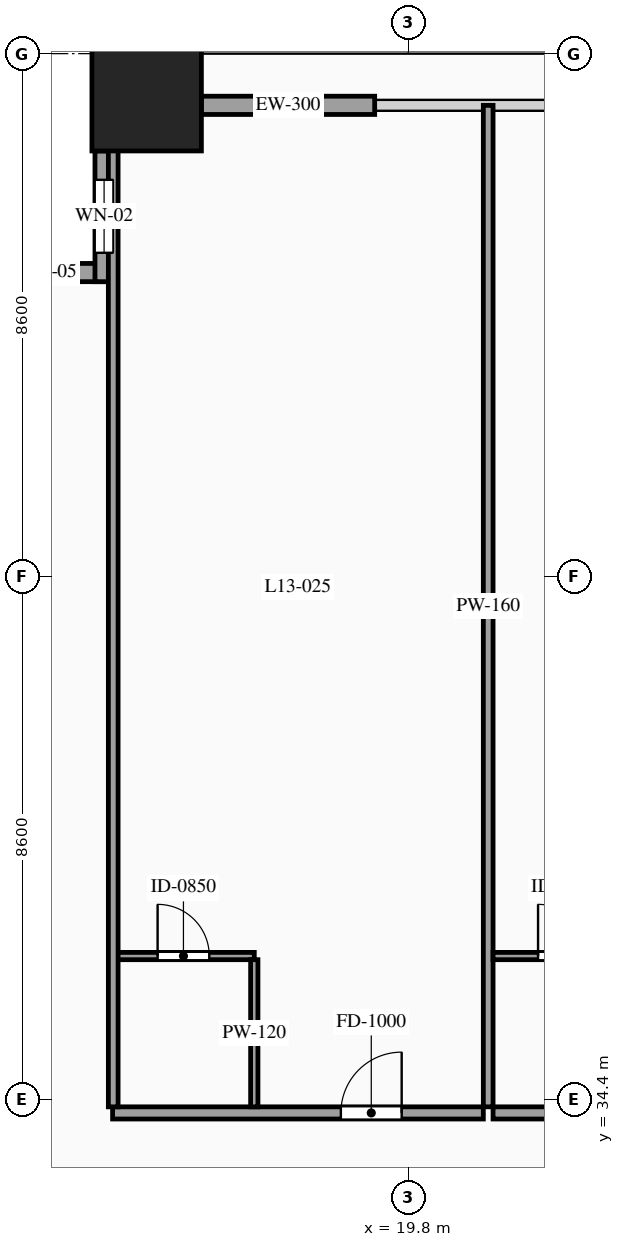
"""IFC4 building model, lengths in metres.
Left out: names, types, materials, properties, quantities, classifications, styles, units other than length and angle.
Written with IfcOpenShell. Run it as: python <this file> out.ifc"""

import sys

from ifc_helpers import new_model, si_unit, direction, frame, frame_2d, origin, origin_2d, place, context, subcontext, project, spatial, rectangle, hollow_rectangle, extrude, source, transform, mapped, element, fill, save


model = new_model("IFC4")
c1 = context("Model", 3, precision=1e-05, world=origin(), true_north=direction((0.0, 1.0)))
c2 = subcontext(c1, "Body", "Model", "MODEL_VIEW")
j1 = project(units=[si_unit("LENGTHUNIT", "METRE"), si_unit("PLANEANGLEUNIT", "RADIAN")], contexts=[c1])
p1 = place(None, origin())
s1 = spatial("IfcSite", under=j1, at=p1, CompositionType="ELEMENT")
p2 = place(p1, origin())
s2 = spatial("IfcBuilding", under=s1, at=p2, CompositionType="ELEMENT")
p3 = place(p2, frame((0.0, 0.0, 53.2)))
s3 = spatial("IfcBuildingStorey", under=s2, at=p3, CompositionType="ELEMENT", Elevation=53.2)
m1 = source(origin(), c2, "Body", "SweptSolid", [
    extrude(hollow_rectangle(XDim=1.8, YDim=1.8, WallThickness=0.08, at=origin_2d()), origin(), (0.0, 0.0, 1.0), 3.6),
])
p4 = place(p3, frame((15.5, 50.9, 0.0), z_axis=(0.0, 0.0, 1.0), x_axis=(1.0, 0.0, 0.0)))
e1 = element("IfcColumn", 1, at=p4, inside=s3, PredefinedType="COLUMN", context=c2, shape_type="MappedRepresentation", body=[
    mapped(m1, transform((0.0, 0.0, 0.0), scale=1.0)),
])
p5 = place(p3, frame((14.95, 48.0, 0.0), z_axis=(0.0, 0.0, 1.0), x_axis=(-1.0, 0.0, 0.0)))
e2 = element("IfcWall", 2, at=p5, inside=s3, PredefinedType="SOLIDWALL", context=c2, shape_type="SweptSolid", body=[
    extrude(rectangle(XDim=2.15, YDim=0.3, at=frame_2d((1.075, 0.0))), origin(), (0.0, 0.0, 1.0), 3.38),
])
p6 = place(p5, frame((0.625, 0.0, 0.85)))
e3 = element("IfcOpeningElement", 3, at=p6, cuts=e2, PredefinedType="OPENING", context=c2, shape_type="SweptSolid", body=[
    extrude(rectangle(XDim=0.9, YDim=1.5, at=frame_2d((0.45, 0.75))), frame((0.0, 0.165, 0.0), z_axis=(0.0, -1.0, 0.0), x_axis=(1.0, 0.0, 0.0)), (0.0, 0.0, 1.0), 0.33),
])
p7 = place(p3, frame((14.8, 50.0, 0.0), z_axis=(0.0, 0.0, 1.0), x_axis=(0.0, -1.0, 0.0)))
e4 = element("IfcWall", 4, at=p7, inside=s3, PredefinedType="SOLIDWALL", context=c2, shape_type="SweptSolid", body=[
    extrude(rectangle(XDim=2.15, YDim=0.3, at=frame_2d((1.075, 0.0))), origin(), (0.0, 0.0, 1.0), 3.38),
])
p8 = place(p7, frame((0.475, 0.0, 0.85)))
e5 = element("IfcOpeningElement", 5, at=p8, cuts=e4, PredefinedType="OPENING", context=c2, shape_type="SweptSolid", body=[
    extrude(rectangle(XDim=1.2, YDim=2.1, at=frame_2d((0.6, 1.05))), frame((0.0, 0.165, 0.0), z_axis=(0.0, -1.0, 0.0), x_axis=(1.0, 0.0, 0.0)), (0.0, 0.0, 1.0), 0.33),
])
m2 = source(origin(), c2, "Body", "SweptSolid", [
    extrude(rectangle(XDim=2.85, YDim=0.3, at=frame_2d((1.425, 0.0))), origin(), (0.0, 0.0, 1.0), 2.775),
])
p9 = place(p3, frame((16.4, 50.75, 0.0), z_axis=(0.0, 0.0, 1.0), x_axis=(1.0, 0.0, 0.0)))
e6 = element("IfcWall", 6, at=p9, inside=s3, PredefinedType="SOLIDWALL", context=c2, shape_type="MappedRepresentation", body=[
    mapped(m2, transform((0.0, 0.0, 0.0), scale=1.0)),
])
p10 = place(p3, frame((14.94, 34.18, 0.0), z_axis=(0.0, 0.0, 1.0), x_axis=(1.0, 0.0, 0.0)))
e7 = element("IfcWall", 7, at=p10, inside=s3, PredefinedType="PARTITIONING", context=c2, shape_type="SweptSolid", body=[
    extrude(rectangle(XDim=6.097, YDim=0.2, at=frame_2d((3.049, 0.0))), origin(), (0.0, 0.0, 1.0), 3.38),
])
p11 = place(p10, frame((3.754, 0.0, 0.0)))
e8 = element("IfcOpeningElement", 8, at=p11, cuts=e7, PredefinedType="OPENING", context=c2, shape_type="SweptSolid", body=[
    extrude(rectangle(XDim=1.0, YDim=2.2, at=frame_2d((0.5, 1.1))), frame((0.0, 0.115, 0.0), z_axis=(0.0, -1.0, 0.0), x_axis=(1.0, 0.0, 0.0)), (0.0, 0.0, 1.0), 0.23),
])
m3 = source(origin(), c2, "Body", "SweptSolid", [
    extrude(rectangle(XDim=16.47, YDim=0.16, at=frame_2d((8.235, 0.0))), origin(), (0.0, 0.0, 1.0), 3.38),
])
p12 = place(p3, frame((21.117, 34.28, 0.0), z_axis=(0.0, 0.0, 1.0), x_axis=(0.0, 1.0, 0.0)))
e9 = element("IfcWall", 9, at=p12, inside=s3, PredefinedType="PARTITIONING", context=c2, shape_type="MappedRepresentation", body=[
    mapped(m3, transform((0.0, 0.0, 0.0), scale=1.0)),
])
p13 = place(p3, frame((14.94, 36.76, 0.0), z_axis=(0.0, 0.0, 1.0), x_axis=(1.0, 0.0, 0.0)))
e10 = element("IfcWall", 10, at=p13, inside=s3, PredefinedType="PARTITIONING", context=c2, shape_type="SweptSolid", body=[
    extrude(rectangle(XDim=2.33, YDim=0.12, at=frame_2d((1.165, 0.0))), origin(), (0.0, 0.0, 1.0), 3.38),
])
p14 = place(p13, frame((0.74, 0.0, 0.0)))
e11 = element("IfcOpeningElement", 11, at=p14, cuts=e10, PredefinedType="OPENING", context=c2, shape_type="SweptSolid", body=[
    extrude(rectangle(XDim=0.85, YDim=2.1, at=frame_2d((0.425, 1.05))), frame((0.0, 0.075, 0.0), z_axis=(0.0, -1.0, 0.0), x_axis=(1.0, 0.0, 0.0)), (0.0, 0.0, 1.0), 0.15),
])
m4 = source(origin(), c2, "Body", "SweptSolid", [
    extrude(rectangle(XDim=2.42, YDim=0.12, at=frame_2d((1.21, 0.0))), origin(), (0.0, 0.0, 1.0), 3.38),
])
p15 = place(p3, frame((17.27, 34.28, 0.0), z_axis=(0.0, 0.0, 1.0), x_axis=(0.0, 1.0, 0.0)))
e12 = element("IfcWall", 12, at=p15, inside=s3, PredefinedType="PARTITIONING", context=c2, shape_type="MappedRepresentation", body=[
    mapped(m4, transform((0.0, 0.0, 0.0), scale=1.0)),
])
p16 = place(p3, frame((21.197, 34.18, 0.0), z_axis=(0.0, 0.0, 1.0), x_axis=(1.0, 0.0, 0.0)))
e13 = element("IfcWall", 13, at=p16, inside=s3, PredefinedType="PARTITIONING", context=c2, shape_type="SweptSolid", body=[
    extrude(rectangle(XDim=7.063, YDim=0.2, at=frame_2d((3.531, 0.0))), origin(), (0.0, 0.0, 1.0), 3.38),
])
p17 = place(p16, frame((4.237, 0.0, 0.0)))
e14 = element("IfcOpeningElement", 14, at=p17, cuts=e13, PredefinedType="OPENING", context=c2, shape_type="SweptSolid", body=[
    extrude(rectangle(XDim=1.0, YDim=2.2, at=frame_2d((0.5, 1.1))), frame((0.0, 0.115, 0.0), z_axis=(0.0, -1.0, 0.0), x_axis=(1.0, 0.0, 0.0)), (0.0, 0.0, 1.0), 0.23),
])
p18 = place(p3, frame((21.197, 36.76, 0.0), z_axis=(0.0, 0.0, 1.0), x_axis=(1.0, 0.0, 0.0)))
e15 = element("IfcWall", 15, at=p18, inside=s3, PredefinedType="PARTITIONING", context=c2, shape_type="SweptSolid", body=[
    extrude(rectangle(XDim=2.33, YDim=0.12, at=frame_2d((1.165, 0.0))), origin(), (0.0, 0.0, 1.0), 3.38),
])
p19 = place(p18, frame((0.74, 0.0, 0.0)))
e16 = element("IfcOpeningElement", 16, at=p19, cuts=e15, PredefinedType="OPENING", context=c2, shape_type="SweptSolid", body=[
    extrude(rectangle(XDim=0.85, YDim=2.1, at=frame_2d((0.425, 1.05))), frame((0.0, 0.075, 0.0), z_axis=(0.0, -1.0, 0.0), x_axis=(1.0, 0.0, 0.0)), (0.0, 0.0, 1.0), 0.15),
])
m5 = source(origin(), c2, "Body", "SweptSolid", [
    extrude(rectangle(XDim=16.32, YDim=0.16, at=frame_2d((8.16, 0.0))), origin(), (0.0, 0.0, 1.0), 3.38),
])
p20 = place(p3, frame((14.95, 34.28, 0.0), z_axis=(0.0, 0.0, 1.0), x_axis=(0.0, 1.0, 0.0)))
e17 = element("IfcWall", 17, at=p20, inside=s3, PredefinedType="PARTITIONING", context=c2, shape_type="MappedRepresentation", body=[
    mapped(m5, transform((0.0, 0.0, 0.0), scale=1.0)),
])
m6 = source(origin(), c2, "Body", "SweptSolid", [
    extrude(rectangle(XDim=0.9, YDim=1.5, at=frame_2d((0.45, 0.75))), frame((0.0, 0.03, 0.0), z_axis=(0.0, -1.0, 0.0), x_axis=(1.0, 0.0, 0.0)), (0.0, 0.0, 1.0), 0.06),
])
p21 = place(p6, origin())
e18 = element("IfcWindow", 18, at=p21, inside=s3, PartitioningType="SINGLE_PANEL", PredefinedType="WINDOW", context=c2, shape_type="MappedRepresentation", body=[
    mapped(m6, transform((0.0, 0.0, 0.0), scale=1.0)),
])
fill(e3, e18)
m7 = source(origin(), c2, "Body", "SweptSolid", [
    extrude(rectangle(XDim=1.2, YDim=2.1, at=frame_2d((0.6, 1.05))), frame((0.0, 0.03, 0.0), z_axis=(0.0, -1.0, 0.0), x_axis=(1.0, 0.0, 0.0)), (0.0, 0.0, 1.0), 0.06),
])
p22 = place(p8, origin())
e19 = element("IfcWindow", 19, at=p22, inside=s3, PartitioningType="SINGLE_PANEL", PredefinedType="WINDOW", context=c2, shape_type="MappedRepresentation", body=[
    mapped(m7, transform((0.0, 0.0, 0.0), scale=1.0)),
])
fill(e5, e19)
m8 = source(origin(), c2, "Body", "SweptSolid", [
    extrude(rectangle(XDim=1.0, YDim=2.2, at=frame_2d((0.5, 1.1))), frame((0.0, 0.025, 0.0), z_axis=(0.0, -1.0, 0.0), x_axis=(1.0, 0.0, 0.0)), (0.0, 0.0, 1.0), 0.05),
])
p23 = place(p11, origin())
e20 = element("IfcDoor", 20, at=p23, inside=s3, OperationType="SINGLE_SWING_RIGHT", PredefinedType="DOOR", context=c2, shape_type="MappedRepresentation", body=[
    mapped(m8, transform((0.0, 0.0, 0.0), scale=1.0)),
])
fill(e8, e20)
m9 = source(origin(), c2, "Body", "SweptSolid", [
    extrude(rectangle(XDim=0.85, YDim=2.1, at=frame_2d((0.425, 1.05))), frame((0.0, 0.025, 0.0), z_axis=(0.0, -1.0, 0.0), x_axis=(1.0, 0.0, 0.0)), (0.0, 0.0, 1.0), 0.05),
])
p24 = place(p14, origin())
e21 = element("IfcDoor", 21, at=p24, inside=s3, OperationType="SINGLE_SWING_LEFT", PredefinedType="DOOR", context=c2, shape_type="MappedRepresentation", body=[
    mapped(m9, transform((0.0, 0.0, 0.0), scale=1.0)),
])
fill(e11, e21)
p25 = place(p19, origin())
e22 = element("IfcDoor", 22, at=p25, inside=s3, OperationType="SINGLE_SWING_LEFT", PredefinedType="DOOR", context=c2, shape_type="MappedRepresentation", body=[
    mapped(m9, transform((0.0, 0.0, 0.0), scale=1.0)),
])
fill(e16, e22)
save(model, sys.argv[1])
